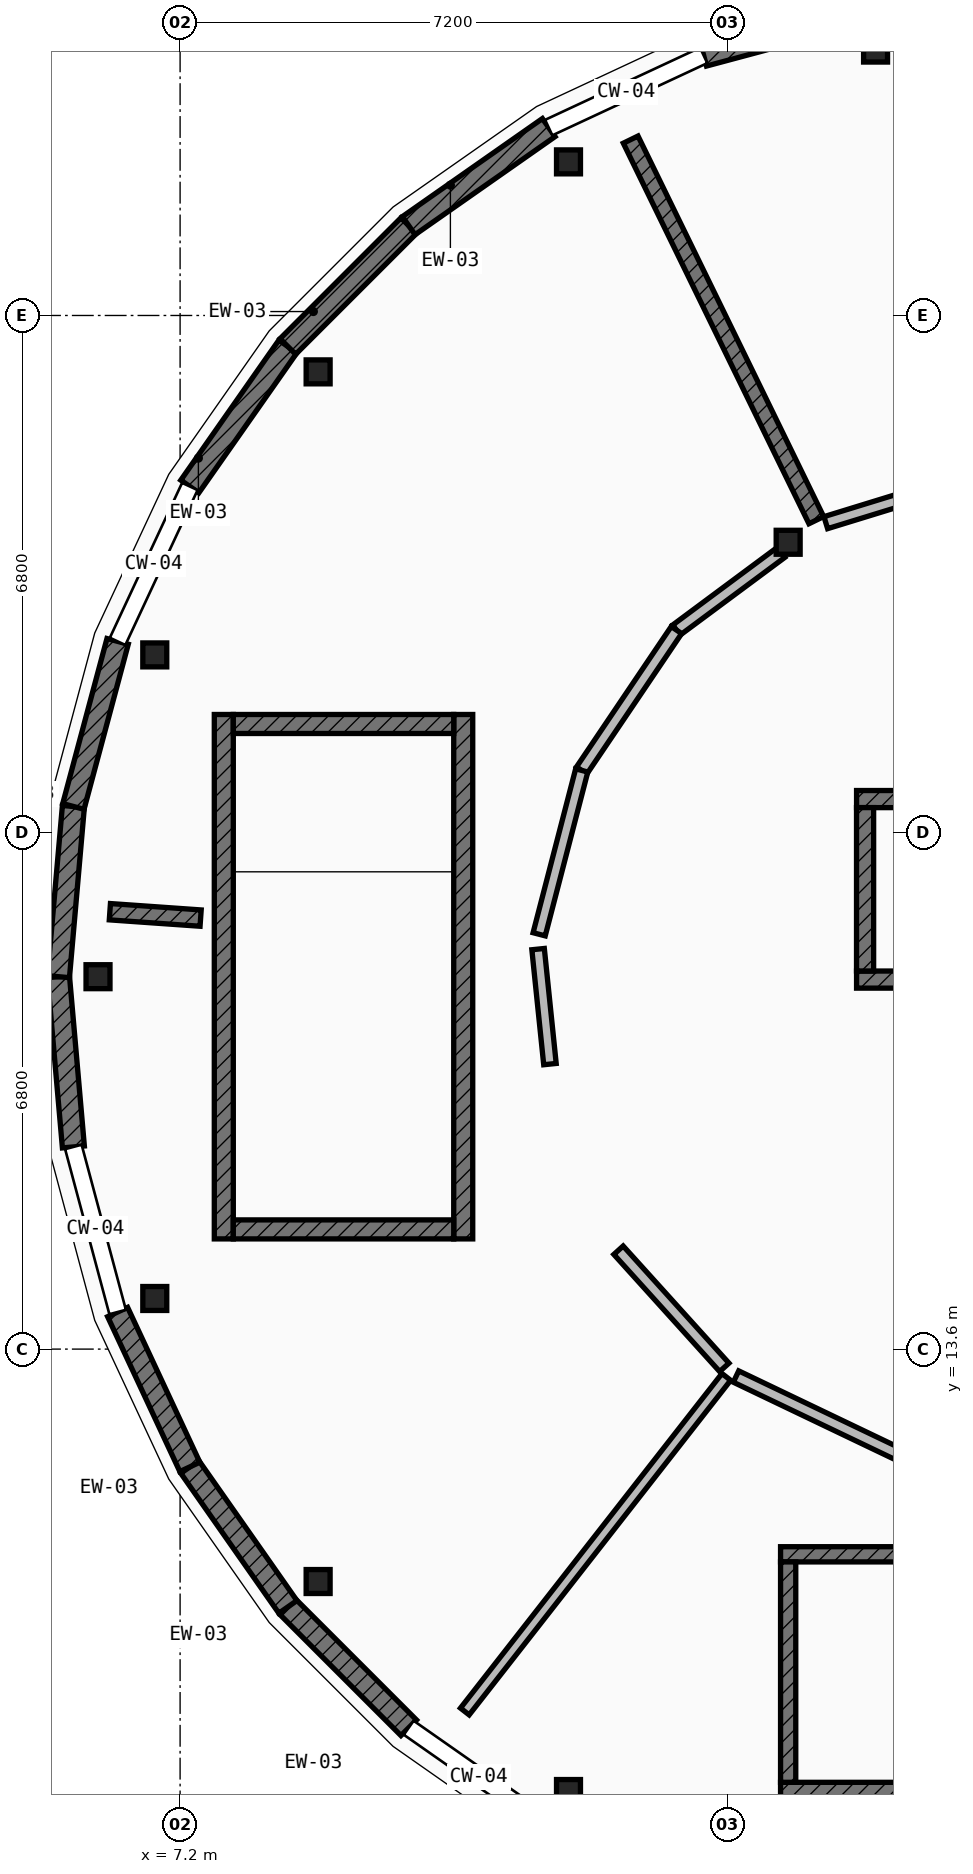
"""IFC4 building model, lengths in metres.
Left out: names, types, materials, properties, quantities, classifications, styles, units other than length and angle.
Written with IfcOpenShell. Run it as: python <this file> out.ifc"""

import sys

from ifc_helpers import new_model, si_unit, direction, frame, frame_2d, origin, origin_2d, place, context, subcontext, project, spatial, rectangle, extrude, element, fill, save


model = new_model("IFC4")
c1 = context("Model", 3, precision=1e-05, world=origin(), true_north=direction((0.0, 1.0)))
c2 = subcontext(c1, "Body", "Model", "MODEL_VIEW")
j1 = project(units=[si_unit("LENGTHUNIT", "METRE"), si_unit("PLANEANGLEUNIT", "RADIAN")], contexts=[c1])
p1 = place(None, origin())
s1 = spatial("IfcSite", under=j1, at=p1, CompositionType="ELEMENT")
p2 = place(p1, origin())
s2 = spatial("IfcBuilding", under=s1, at=p2, CompositionType="ELEMENT")
p3 = place(p2, frame((0.0, 0.0, 12.95)))
s3 = spatial("IfcBuildingStorey", under=s2, at=p3, CompositionType="ELEMENT", Elevation=12.95)
for number, where, z_axis, x_axis in (
    (1, (16.35, 30.692, 0.0), (0.0, 0.0, 1.0), (1.0, 0.0, 0.0)),
    (2, (12.31, 29.221, 0.0), (0.0, 0.0, 1.0), (1.0, 0.0, 0.0)),
    (3, (9.016, 26.458, 0.0), (0.0, 0.0, 1.0), (1.0, 0.0, 0.0)),
    (4, (6.867, 22.734, 0.0), (0.0, 0.0, 1.0), (1.0, 0.0, 0.0)),
    (5, (6.12, 18.5, 0.0), (0.0, 0.0, 1.0), (1.0, 0.0, 0.0)),
    (6, (6.867, 14.266, 0.0), (0.0, 0.0, 1.0), (1.0, 0.0, 0.0)),
    (7, (9.016, 10.542, 0.0), (0.0, 0.0, 1.0), (1.0, 0.0, 0.0)),
    (8, (12.31, 7.779, 0.0), (0.0, 0.0, 1.0), (1.0, 0.0, 0.0)),
    (9, (15.2, 24.216, 0.0), (0.0, 0.0, 1.0), (1.0, 0.0, 0.0)),
):
    element("IfcColumn", number, at=place(p3, frame(where, z_axis=z_axis, x_axis=x_axis)), inside=s3, PredefinedType="COLUMN", context=c2, shape_type="SweptSolid", body=[
        extrude(rectangle(XDim=0.315, YDim=0.315, at=origin_2d()), origin(), (0.0, 0.0, 1.0), 4.2),
    ])
p4 = place(p3, frame((10.208, 8.618, 0.0), z_axis=(0.0, 0.0, 1.0), x_axis=(-0.707106781187, 0.707106781187, 0.0)))
e10 = element("IfcWall", 10, at=p4, inside=s3, PredefinedType="ELEMENTEDWALL", context=c2, shape_type="SweptSolid", body=[
    extrude(rectangle(XDim=2.249, YDim=0.29, at=frame_2d((1.125, 0.0))), origin(), (0.0, 0.0, 1.0), 3.349),
])
p5 = place(p4, frame((0.634, 0.0, 0.85)))
e11 = element("IfcOpeningElement", 11, at=p5, cuts=e10, PredefinedType="OPENING", context=c2, shape_type="SweptSolid", body=[
    extrude(rectangle(XDim=0.98, YDim=1.75, at=frame_2d((0.49, 0.875))), frame((0.0, 0.155, 0.0), z_axis=(0.0, -1.0, 0.0), x_axis=(1.0, 0.0, 0.0)), (0.0, 0.0, 1.0), 0.31),
])
p6 = place(p3, frame((8.618, 10.208, 0.0), z_axis=(0.0, 0.0, 1.0), x_axis=(-0.573644482107, 0.819104393925, 0.0)))
e12 = element("IfcWall", 12, at=p6, inside=s3, PredefinedType="ELEMENTEDWALL", context=c2, shape_type="SweptSolid", body=[
    extrude(rectangle(XDim=2.249, YDim=0.29, at=frame_2d((1.125, 0.0))), origin(), (0.0, 0.0, 1.0), 3.349),
])
p7 = place(p6, frame((0.624, 0.0, 0.85)))
e13 = element("IfcOpeningElement", 13, at=p7, cuts=e12, PredefinedType="OPENING", context=c2, shape_type="SweptSolid", body=[
    extrude(rectangle(XDim=1.0, YDim=1.45, at=frame_2d((0.5, 0.725))), frame((0.0, 0.155, 0.0), z_axis=(0.0, -1.0, 0.0), x_axis=(1.0, 0.0, 0.0)), (0.0, 0.0, 1.0), 0.31),
])
p8 = place(p3, frame((7.328, 12.05, 0.0), z_axis=(0.0, 0.0, 1.0), x_axis=(-0.422504983593, 0.906360600886, 0.0)))
e14 = element("IfcWall", 14, at=p8, inside=s3, PredefinedType="ELEMENTEDWALL", context=c2, shape_type="SweptSolid", body=[
    extrude(rectangle(XDim=2.248, YDim=0.29, at=frame_2d((1.124, 0.0))), origin(), (0.0, 0.0, 1.0), 3.349),
])
p9 = place(p8, frame((0.624, 0.0, 0.85)))
e15 = element("IfcOpeningElement", 15, at=p9, cuts=e14, PredefinedType="OPENING", context=c2, shape_type="SweptSolid", body=[
    extrude(rectangle(XDim=1.0, YDim=1.75, at=frame_2d((0.5, 0.875))), frame((0.0, 0.155, 0.0), z_axis=(0.0, -1.0, 0.0), x_axis=(1.0, 0.0, 0.0)), (0.0, 0.0, 1.0), 0.31),
])
for number, where, z_axis, x_axis in (
    (16, (5.796, 16.26, 0.0), (0.0, 0.0, 1.0), (-0.087, 0.996, 0.0)),
    (17, (5.6, 18.5, 0.0), (0.0, 0.0, 1.0), (0.087, 0.996, 0.0)),
):
    element("IfcWall", number, at=place(p3, frame(where, z_axis=z_axis, x_axis=x_axis)), inside=s3, PredefinedType="ELEMENTEDWALL", context=c2, shape_type="SweptSolid", body=[
        extrude(rectangle(XDim=2.249, YDim=0.29, at=frame_2d((1.124, 0.0))), origin(), (0.0, 0.0, 1.0), 3.349),
    ])
p10 = place(p3, frame((5.796, 20.74, 0.0), z_axis=(0.0, 0.0, 1.0), x_axis=(0.258824721145, 0.96592430538, 0.0)))
e18 = element("IfcWall", 18, at=p10, inside=s3, PredefinedType="ELEMENTEDWALL", context=c2, shape_type="SweptSolid", body=[
    extrude(rectangle(XDim=2.249, YDim=0.29, at=frame_2d((1.125, 0.0))), origin(), (0.0, 0.0, 1.0), 3.349),
])
p11 = place(p10, frame((0.624, 0.0, 0.85)))
e19 = element("IfcOpeningElement", 19, at=p11, cuts=e18, PredefinedType="OPENING", context=c2, shape_type="SweptSolid", body=[
    extrude(rectangle(XDim=1.0, YDim=2.0, at=frame_2d((0.5, 1.0))), frame((0.0, 0.155, 0.0), z_axis=(0.0, -1.0, 0.0), x_axis=(1.0, 0.0, 0.0)), (0.0, 0.0, 1.0), 0.31),
])
p12 = place(p3, frame((7.328, 24.95, 0.0), z_axis=(0.0, 0.0, 1.0), x_axis=(0.573644482107, 0.819104393925, 0.0)))
e20 = element("IfcWall", 20, at=p12, inside=s3, PredefinedType="ELEMENTEDWALL", context=c2, shape_type="SweptSolid", body=[
    extrude(rectangle(XDim=2.249, YDim=0.29, at=frame_2d((1.125, 0.0))), origin(), (0.0, 0.0, 1.0), 3.349),
])
p13 = place(p12, frame((0.614, 0.0, 0.85)))
e21 = element("IfcOpeningElement", 21, at=p13, cuts=e20, PredefinedType="OPENING", context=c2, shape_type="SweptSolid", body=[
    extrude(rectangle(XDim=1.02, YDim=1.6, at=frame_2d((0.51, 0.8))), frame((0.0, 0.155, 0.0), z_axis=(0.0, -1.0, 0.0), x_axis=(1.0, 0.0, 0.0)), (0.0, 0.0, 1.0), 0.31),
])
p14 = place(p3, frame((8.618, 26.792, 0.0), z_axis=(0.0, 0.0, 1.0), x_axis=(0.707106781187, 0.707106781187, 0.0)))
e22 = element("IfcWall", 22, at=p14, inside=s3, PredefinedType="ELEMENTEDWALL", context=c2, shape_type="SweptSolid", body=[
    extrude(rectangle(XDim=2.249, YDim=0.29, at=frame_2d((1.125, 0.0))), origin(), (0.0, 0.0, 1.0), 3.349),
])
p15 = place(p14, frame((0.599, 0.0, 0.85)))
e23 = element("IfcOpeningElement", 23, at=p15, cuts=e22, PredefinedType="OPENING", context=c2, shape_type="SweptSolid", body=[
    extrude(rectangle(XDim=1.05, YDim=1.35, at=frame_2d((0.525, 0.675))), frame((0.0, 0.155, 0.0), z_axis=(0.0, -1.0, 0.0), x_axis=(1.0, 0.0, 0.0)), (0.0, 0.0, 1.0), 0.31),
])
p16 = place(p3, frame((10.208, 28.382, 0.0), z_axis=(0.0, 0.0, 1.0), x_axis=(0.819104393925, 0.573644482107, 0.0)))
e24 = element("IfcWall", 24, at=p16, inside=s3, PredefinedType="ELEMENTEDWALL", context=c2, shape_type="SweptSolid", body=[
    extrude(rectangle(XDim=2.249, YDim=0.29, at=frame_2d((1.125, 0.0))), origin(), (0.0, 0.0, 1.0), 3.349),
])
p17 = place(p16, frame((0.599, 0.0, 0.85)))
e25 = element("IfcOpeningElement", 25, at=p17, cuts=e24, PredefinedType="OPENING", context=c2, shape_type="SweptSolid", body=[
    extrude(rectangle(XDim=1.05, YDim=1.6, at=frame_2d((0.525, 0.8))), frame((0.0, 0.155, 0.0), z_axis=(0.0, -1.0, 0.0), x_axis=(1.0, 0.0, 0.0)), (0.0, 0.0, 1.0), 0.31),
])
p18 = place(p3, frame((14.088, 30.622, 0.0), z_axis=(0.0, 0.0, 1.0), x_axis=(0.96592430538, 0.258824721145, 0.0)))
e26 = element("IfcWall", 26, at=p18, inside=s3, PredefinedType="ELEMENTEDWALL", context=c2, shape_type="SweptSolid", body=[
    extrude(rectangle(XDim=2.249, YDim=0.29, at=frame_2d((1.125, 0.0))), origin(), (0.0, 0.0, 1.0), 3.349),
])
p19 = place(p18, frame((0.599, 0.0, 0.85)))
e27 = element("IfcOpeningElement", 27, at=p19, cuts=e26, PredefinedType="OPENING", context=c2, shape_type="SweptSolid", body=[
    extrude(rectangle(XDim=1.05, YDim=1.9, at=frame_2d((0.525, 0.95))), frame((0.0, 0.155, 0.0), z_axis=(0.0, -1.0, 0.0), x_axis=(1.0, 0.0, 0.0)), (0.0, 0.0, 1.0), 0.31),
])
p20 = place(p3, frame((10.925, 15.05, 0.0), z_axis=(0.0, 0.0, 1.0), x_axis=(0.0, 1.0, 0.0)))
e28 = element("IfcWall", 28, at=p20, inside=s3, PredefinedType="SHEAR", context=c2, shape_type="SweptSolid", body=[
    extrude(rectangle(XDim=6.9, YDim=0.25, at=frame_2d((3.45, 0.0))), origin(), (0.0, 0.0, 1.0), 3.995),
])
p21 = place(p20, frame((0.43, 0.0, 0.0)))
e29 = element("IfcOpeningElement", 29, at=p21, cuts=e28, PredefinedType="OPENING", context=c2, shape_type="SweptSolid", body=[
    extrude(rectangle(XDim=1.1, YDim=2.15, at=frame_2d((0.55, 1.075))), frame((0.0, 0.135, 0.0), z_axis=(0.0, -1.0, 0.0), x_axis=(1.0, 0.0, 0.0)), (0.0, 0.0, 1.0), 0.27),
])
p22 = place(p3, frame((7.775, 15.05, 0.0), z_axis=(0.0, 0.0, 1.0), x_axis=(0.0, 1.0, 0.0)))
e30 = element("IfcWall", 30, at=p22, inside=s3, PredefinedType="SHEAR", context=c2, shape_type="SweptSolid", body=[
    extrude(rectangle(XDim=6.9, YDim=0.25, at=frame_2d((3.45, 0.0))), origin(), (0.0, 0.0, 1.0), 3.995),
])
for number, where, z_axis, x_axis in (
    (31, (10.8, 15.175, 0.0), (0.0, 0.0, 1.0), (-1.0, 0.0, 0.0)),
    (32, (10.8, 21.825, 0.0), (0.0, 0.0, 1.0), (-1.0, 0.0, 0.0)),
):
    element("IfcWall", number, at=place(p3, frame(where, z_axis=z_axis, x_axis=x_axis)), inside=s3, PredefinedType="SHEAR", context=c2, shape_type="SweptSolid", body=[
        extrude(rectangle(XDim=2.9, YDim=0.25, at=frame_2d((1.45, 0.0))), origin(), (0.0, 0.0, 1.0), 3.995),
    ])
p23 = place(p3, frame((21.9, 10.9, 0.0), z_axis=(0.0, 0.0, 1.0), x_axis=(-1.0, 0.0, 0.0)))
e33 = element("IfcWall", 33, at=p23, inside=s3, PredefinedType="SHEAR", context=c2, shape_type="SweptSolid", body=[
    extrude(rectangle(XDim=6.8, YDim=0.2, at=frame_2d((3.4, 0.0))), origin(), (0.0, 0.0, 1.0), 3.995),
])
p24 = place(p23, frame((0.38, 0.0, 0.0)))
e34 = element("IfcOpeningElement", 34, at=p24, cuts=e33, PredefinedType="OPENING", context=c2, shape_type="SweptSolid", body=[
    extrude(rectangle(XDim=1.05, YDim=2.15, at=frame_2d((0.525, 1.075))), frame((0.0, 0.11, 0.0), z_axis=(0.0, -1.0, 0.0), x_axis=(1.0, 0.0, 0.0)), (0.0, 0.0, 1.0), 0.22),
])
p25 = place(p3, frame((21.9, 7.8, 0.0), z_axis=(0.0, 0.0, 1.0), x_axis=(-1.0, 0.0, 0.0)))
e35 = element("IfcWall", 35, at=p25, inside=s3, PredefinedType="SHEAR", context=c2, shape_type="SweptSolid", body=[
    extrude(rectangle(XDim=6.8, YDim=0.2, at=frame_2d((3.4, 0.0))), origin(), (0.0, 0.0, 1.0), 3.995),
])
p26 = place(p3, frame((15.2, 10.8, 0.0), z_axis=(0.0, 0.0, 1.0), x_axis=(0.0, -1.0, 0.0)))
e36 = element("IfcWall", 36, at=p26, inside=s3, PredefinedType="SHEAR", context=c2, shape_type="SweptSolid", body=[
    extrude(rectangle(XDim=2.9, YDim=0.2, at=frame_2d((1.45, 0.0))), origin(), (0.0, 0.0, 1.0), 3.995),
])
p27 = place(p3, frame((16.1, 18.462, 0.0), z_axis=(0.0, 0.0, 1.0), x_axis=(1.0, 0.0, 0.0)))
e37 = element("IfcWall", 37, at=p27, inside=s3, PredefinedType="SHEAR", context=c2, shape_type="SweptSolid", body=[
    extrude(rectangle(XDim=3.1, YDim=0.225, at=frame_2d((1.55, 0.0))), origin(), (0.0, 0.0, 1.0), 3.995),
])
p28 = place(p27, frame((0.9, 0.0, 0.0)))
e38 = element("IfcOpeningElement", 38, at=p28, cuts=e37, PredefinedType="OPENING", context=c2, shape_type="SweptSolid", body=[
    extrude(rectangle(XDim=1.3, YDim=2.2, at=frame_2d((0.65, 1.1))), frame((0.0, 0.123, 0.0), z_axis=(0.0, -1.0, 0.0), x_axis=(1.0, 0.0, 0.0)), (0.0, 0.0, 1.0), 0.245),
])
p29 = place(p3, frame((16.1, 20.837, 0.0), z_axis=(0.0, 0.0, 1.0), x_axis=(1.0, 0.0, 0.0)))
e39 = element("IfcWall", 39, at=p29, inside=s3, PredefinedType="SHEAR", context=c2, shape_type="SweptSolid", body=[
    extrude(rectangle(XDim=3.1, YDim=0.225, at=frame_2d((1.55, 0.0))), origin(), (0.0, 0.0, 1.0), 3.995),
])
p30 = place(p3, frame((16.212, 18.575, 0.0), z_axis=(0.0, 0.0, 1.0), x_axis=(0.0, 1.0, 0.0)))
e40 = element("IfcWall", 40, at=p30, inside=s3, PredefinedType="SHEAR", context=c2, shape_type="SweptSolid", body=[
    extrude(rectangle(XDim=2.15, YDim=0.225, at=frame_2d((1.075, 0.0))), origin(), (0.0, 0.0, 1.0), 3.995),
])
p31 = place(p3, frame((15.57, 24.507, 0.0), z_axis=(0.0, 0.0, 1.0), x_axis=(-0.438391683607, 0.898784029533, 0.0)))
e41 = element("IfcWall", 41, at=p31, inside=s3, PredefinedType="SOLIDWALL", context=c2, shape_type="SweptSolid", body=[
    extrude(rectangle(XDim=5.571, YDim=0.215, at=frame_2d((2.785, 0.0))), origin(), (0.0, 0.0, 1.0), 3.324),
])
p32 = place(p3, frame((7.47, 19.271, 0.0), z_axis=(0.0, 0.0, 1.0), x_axis=(-0.997535754683, 0.070159946762, 0.0)))
e42 = element("IfcWall", 42, at=p32, inside=s3, PredefinedType="SOLIDWALL", context=c2, shape_type="SweptSolid", body=[
    extrude(rectangle(XDim=1.197, YDim=0.215, at=frame_2d((0.599, 0.0))), origin(), (0.0, 0.0, 1.0), 3.324),
])
p33 = place(p3, frame((14.386, 13.234, 0.0), z_axis=(0.0, 0.0, 1.0), x_axis=(-0.615754283542, -0.787938235079, 0.0)))
e43 = element("IfcWall", 43, at=p33, inside=s3, PredefinedType="PARTITIONING", context=c2, shape_type="SweptSolid", body=[
    extrude(rectangle(XDim=5.587, YDim=0.145, at=frame_2d((2.793, 0.0))), origin(), (0.0, 0.0, 1.0), 3.324),
])
p34 = place(p3, frame((15.107, 24.083, 0.0), z_axis=(0.0, 0.0, 1.0), x_axis=(-0.802996920627, -0.595983175487, 0.0)))
e44 = element("IfcWall", 44, at=p34, inside=s3, PredefinedType="PARTITIONING", context=c2, shape_type="SweptSolid", body=[
    extrude(rectangle(XDim=1.715, YDim=0.165, at=frame_2d((0.857, 0.0))), origin(), (0.0, 0.0, 1.0), 3.324),
])
p35 = place(p34, frame((0.407, 0.0, 0.0)))
e45 = element("IfcOpeningElement", 45, at=p35, cuts=e44, PredefinedType="OPENING", context=c2, shape_type="SweptSolid", body=[
    extrude(rectangle(XDim=0.9, YDim=2.1, at=frame_2d((0.45, 1.05))), frame((0.0, 0.093, 0.0), z_axis=(0.0, -1.0, 0.0), x_axis=(1.0, 0.0, 0.0)), (0.0, 0.0, 1.0), 0.185),
])
p36 = place(p3, frame((13.73, 23.061, 0.0), z_axis=(0.0, 0.0, 1.0), x_axis=(-0.559294051813, -0.828969338159, 0.0)))
e46 = element("IfcWall", 46, at=p36, inside=s3, PredefinedType="PARTITIONING", context=c2, shape_type="SweptSolid", body=[
    extrude(rectangle(XDim=2.228, YDim=0.165, at=frame_2d((1.114, 0.0))), origin(), (0.0, 0.0, 1.0), 3.324),
])
p37 = place(p3, frame((12.484, 21.214, 0.0), z_axis=(0.0, 0.0, 1.0), x_axis=(-0.251319689769, -0.967904134475, 0.0)))
e47 = element("IfcWall", 47, at=p37, inside=s3, PredefinedType="PARTITIONING", context=c2, shape_type="SweptSolid", body=[
    extrude(rectangle(XDim=2.228, YDim=0.165, at=frame_2d((1.114, 0.0))), origin(), (0.0, 0.0, 1.0), 3.324),
])
p38 = place(p3, frame((11.91, 18.863, 0.0), z_axis=(0.0, 0.0, 1.0), x_axis=(0.102570557108, -0.994725731453, 0.0)))
e48 = element("IfcWall", 48, at=p38, inside=s3, PredefinedType="PARTITIONING", context=c2, shape_type="SweptSolid", body=[
    extrude(rectangle(XDim=1.521, YDim=0.165, at=frame_2d((0.76, 0.0))), origin(), (0.0, 0.0, 1.0), 3.324),
])
p39 = place(p3, frame((12.968, 14.901, 0.0), z_axis=(0.0, 0.0, 1.0), x_axis=(0.670399039083, -0.742000760374, 0.0)))
e49 = element("IfcWall", 49, at=p39, inside=s3, PredefinedType="PARTITIONING", context=c2, shape_type="SweptSolid", body=[
    extrude(rectangle(XDim=2.076, YDim=0.165, at=frame_2d((1.038, 0.0))), origin(), (0.0, 0.0, 1.0), 3.324),
])
p40 = place(p39, frame((0.363, 0.0, 0.0)))
e50 = element("IfcOpeningElement", 50, at=p40, cuts=e49, PredefinedType="OPENING", context=c2, shape_type="SweptSolid", body=[
    extrude(rectangle(XDim=1.35, YDim=2.22, at=frame_2d((0.675, 1.11))), frame((0.0, 0.093, 0.0), z_axis=(0.0, -1.0, 0.0), x_axis=(1.0, 0.0, 0.0)), (0.0, 0.0, 1.0), 0.185),
])
p41 = place(p3, frame((14.514, 13.239, 0.0), z_axis=(0.0, 0.0, 1.0), x_axis=(0.902071813547, -0.431585962705, 0.0)))
e51 = element("IfcWall", 51, at=p41, inside=s3, PredefinedType="PARTITIONING", context=c2, shape_type="SweptSolid", body=[
    extrude(rectangle(XDim=2.648, YDim=0.165, at=frame_2d((1.324, 0.0))), origin(), (0.0, 0.0, 1.0), 3.324),
])
p42 = place(p41, frame((0.829, 0.0, 0.0)))
e52 = element("IfcOpeningElement", 52, at=p42, cuts=e51, PredefinedType="OPENING", context=c2, shape_type="SweptSolid", body=[
    extrude(rectangle(XDim=0.99, YDim=2.22, at=frame_2d((0.495, 1.11))), frame((0.0, 0.093, 0.0), z_axis=(0.0, -1.0, 0.0), x_axis=(1.0, 0.0, 0.0)), (0.0, 0.0, 1.0), 0.185),
])
p43 = place(p3, frame((17.468, 25.019, 0.0), z_axis=(0.0, 0.0, 1.0), x_axis=(-0.955870034048, -0.293789853483, 0.0)))
e53 = element("IfcWall", 53, at=p43, inside=s3, PredefinedType="PARTITIONING", context=c2, shape_type="SweptSolid", body=[
    extrude(rectangle(XDim=1.855, YDim=0.165, at=frame_2d((0.927, 0.0))), origin(), (0.0, 0.0, 1.0), 3.324),
])
p44 = place(p5, origin())
e54 = element("IfcWindow", 54, at=p44, inside=s3, PartitioningType="SINGLE_PANEL", PredefinedType="WINDOW", context=c2, shape_type="SweptSolid", body=[
    extrude(rectangle(XDim=0.98, YDim=1.75, at=frame_2d((0.49, 0.875))), frame((0.0, 0.03, 0.0), z_axis=(0.0, -1.0, 0.0), x_axis=(1.0, 0.0, 0.0)), (0.0, 0.0, 1.0), 0.06),
])
fill(e11, e54)
p45 = place(p7, origin())
e55 = element("IfcWindow", 55, at=p45, inside=s3, PartitioningType="SINGLE_PANEL", PredefinedType="WINDOW", context=c2, shape_type="SweptSolid", body=[
    extrude(rectangle(XDim=1.0, YDim=1.45, at=frame_2d((0.5, 0.725))), frame((0.0, 0.03, 0.0), z_axis=(0.0, -1.0, 0.0), x_axis=(1.0, 0.0, 0.0)), (0.0, 0.0, 1.0), 0.06),
])
fill(e13, e55)
p46 = place(p9, origin())
e56 = element("IfcWindow", 56, at=p46, inside=s3, PartitioningType="SINGLE_PANEL", PredefinedType="WINDOW", context=c2, shape_type="SweptSolid", body=[
    extrude(rectangle(XDim=1.0, YDim=1.75, at=frame_2d((0.5, 0.875))), frame((0.0, 0.03, 0.0), z_axis=(0.0, -1.0, 0.0), x_axis=(1.0, 0.0, 0.0)), (0.0, 0.0, 1.0), 0.06),
])
fill(e15, e56)
p47 = place(p11, origin())
e57 = element("IfcWindow", 57, at=p47, inside=s3, PartitioningType="SINGLE_PANEL", PredefinedType="WINDOW", context=c2, shape_type="SweptSolid", body=[
    extrude(rectangle(XDim=1.0, YDim=2.0, at=frame_2d((0.5, 1.0))), frame((0.0, 0.03, 0.0), z_axis=(0.0, -1.0, 0.0), x_axis=(1.0, 0.0, 0.0)), (0.0, 0.0, 1.0), 0.06),
])
fill(e19, e57)
p48 = place(p13, origin())
e58 = element("IfcWindow", 58, at=p48, inside=s3, PartitioningType="SINGLE_PANEL", PredefinedType="WINDOW", context=c2, shape_type="SweptSolid", body=[
    extrude(rectangle(XDim=1.02, YDim=1.6, at=frame_2d((0.51, 0.8))), frame((0.0, 0.03, 0.0), z_axis=(0.0, -1.0, 0.0), x_axis=(1.0, 0.0, 0.0)), (0.0, 0.0, 1.0), 0.06),
])
fill(e21, e58)
p49 = place(p15, origin())
e59 = element("IfcWindow", 59, at=p49, inside=s3, PartitioningType="SINGLE_PANEL", PredefinedType="WINDOW", context=c2, shape_type="SweptSolid", body=[
    extrude(rectangle(XDim=1.05, YDim=1.35, at=frame_2d((0.525, 0.675))), frame((0.0, 0.03, 0.0), z_axis=(0.0, -1.0, 0.0), x_axis=(1.0, 0.0, 0.0)), (0.0, 0.0, 1.0), 0.06),
])
fill(e23, e59)
p50 = place(p17, origin())
e60 = element("IfcWindow", 60, at=p50, inside=s3, PartitioningType="SINGLE_PANEL", PredefinedType="WINDOW", context=c2, shape_type="SweptSolid", body=[
    extrude(rectangle(XDim=1.05, YDim=1.6, at=frame_2d((0.525, 0.8))), frame((0.0, 0.03, 0.0), z_axis=(0.0, -1.0, 0.0), x_axis=(1.0, 0.0, 0.0)), (0.0, 0.0, 1.0), 0.06),
])
fill(e25, e60)
p51 = place(p21, origin())
e61 = element("IfcDoor", 61, at=p51, inside=s3, OperationType="SINGLE_SWING_LEFT", PredefinedType="DOOR", context=c2, shape_type="SweptSolid", body=[
    extrude(rectangle(XDim=1.1, YDim=2.15, at=frame_2d((0.55, 1.075))), frame((0.0, 0.025, 0.0), z_axis=(0.0, -1.0, 0.0), x_axis=(1.0, 0.0, 0.0)), (0.0, 0.0, 1.0), 0.05),
])
fill(e29, e61)
p52 = place(p35, origin())
e62 = element("IfcDoor", 62, at=p52, inside=s3, OperationType="SINGLE_SWING_LEFT", PredefinedType="DOOR", context=c2, shape_type="SweptSolid", body=[
    extrude(rectangle(XDim=0.9, YDim=2.1, at=frame_2d((0.45, 1.05))), frame((0.0, 0.025, 0.0), z_axis=(0.0, -1.0, 0.0), x_axis=(1.0, 0.0, 0.0)), (0.0, 0.0, 1.0), 0.05),
])
fill(e45, e62)
p53 = place(p40, origin())
e63 = element("IfcDoor", 63, at=p53, inside=s3, OperationType="SINGLE_SWING_RIGHT", PredefinedType="DOOR", context=c2, shape_type="SweptSolid", body=[
    extrude(rectangle(XDim=1.35, YDim=2.22, at=frame_2d((0.675, 1.11))), frame((0.0, 0.025, 0.0), z_axis=(0.0, -1.0, 0.0), x_axis=(1.0, 0.0, 0.0)), (0.0, 0.0, 1.0), 0.05),
])
fill(e50, e63)
p54 = place(p42, origin())
e64 = element("IfcDoor", 64, at=p54, inside=s3, OperationType="SINGLE_SWING_LEFT", PredefinedType="DOOR", context=c2, shape_type="SweptSolid", body=[
    extrude(rectangle(XDim=0.99, YDim=2.22, at=frame_2d((0.495, 1.11))), frame((0.0, 0.025, 0.0), z_axis=(0.0, -1.0, 0.0), x_axis=(1.0, 0.0, 0.0)), (0.0, 0.0, 1.0), 0.05),
])
fill(e52, e64)
save(model, sys.argv[1])
